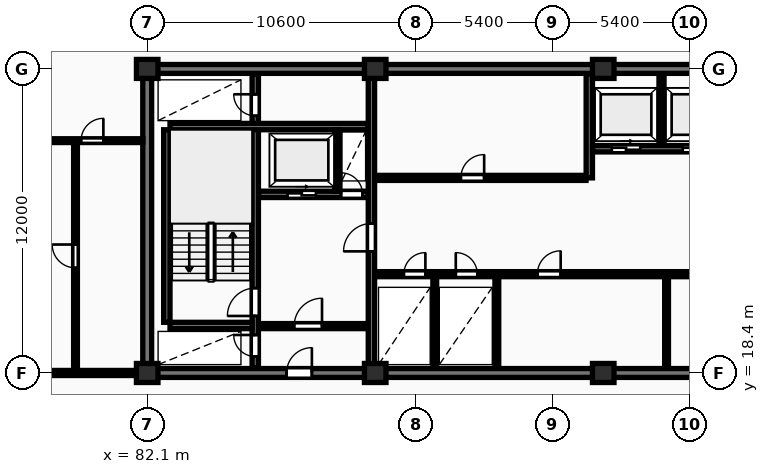
"""IFC4 building model, lengths in metres.
Left out: names, types, materials, properties, quantities, classifications, styles, units other than length and angle.
Written with IfcOpenShell. Run it as: python <this file> out.ifc"""

import sys

from ifc_helpers import new_model, si_unit, direction, frame, frame_2d, origin, origin_2d, place, context, subcontext, project, spatial, rectangle, extrude, element, fill, save


model = new_model("IFC4")
c1 = context("Model", 3, precision=1e-05, world=origin(), true_north=direction((0.0, 1.0)))
c2 = subcontext(c1, "Body", "Model", "MODEL_VIEW")
j1 = project(units=[si_unit("LENGTHUNIT", "METRE"), si_unit("PLANEANGLEUNIT", "RADIAN")], contexts=[c1])
p1 = place(None, origin())
s1 = spatial("IfcSite", under=j1, at=p1, CompositionType="ELEMENT")
p2 = place(p1, origin())
s2 = spatial("IfcBuilding", under=s1, at=p2, CompositionType="ELEMENT")
p3 = place(p2, frame((0.0, 0.0, 113.3)))
s3 = spatial("IfcBuildingStorey", under=s2, at=p3, CompositionType="ELEMENT", Elevation=113.3)
for number, where, z_axis, x_axis in (
    (1, (82.1, 18.4, 0.0), (0.0, 0.0, 1.0), (1.0, 0.0, 0.0)),
    (2, (82.1, 30.4, 0.0), (0.0, 0.0, 1.0), (1.0, 0.0, 0.0)),
    (3, (91.1, 18.4, 0.0), (0.0, 0.0, 1.0), (1.0, 0.0, 0.0)),
    (4, (91.1, 30.4, 0.0), (0.0, 0.0, 1.0), (1.0, 0.0, 0.0)),
    (5, (100.1, 18.4, 0.0), (0.0, 0.0, 1.0), (1.0, 0.0, 0.0)),
    (6, (100.1, 30.4, 0.0), (0.0, 0.0, 1.0), (1.0, 0.0, 0.0)),
):
    element("IfcColumn", number, at=place(p3, frame(where, z_axis=z_axis, x_axis=x_axis)), inside=s3, PredefinedType="COLUMN", context=c2, shape_type="SweptSolid", body=[
        extrude(rectangle(XDim=0.85, YDim=0.75, at=origin_2d()), origin(), (0.0, 0.0, 1.0), 3.25),
    ])
p4 = place(p3, frame((81.925, 30.4, 0.0), z_axis=(0.0, 0.0, 1.0), x_axis=(1.0, 0.0, 0.0)))
e7 = element("IfcWall", 7, at=p4, inside=s3, PredefinedType="SHEAR", context=c2, shape_type="SweptSolid", body=[
    extrude(rectangle(XDim=36.265, YDim=0.35, at=frame_2d((18.132, 0.0))), origin(), (0.0, 0.0, 1.0), 3.25),
])
p5 = place(p3, frame((82.1, 18.575, 0.0), z_axis=(0.0, 0.0, 1.0), x_axis=(0.0, 1.0, 0.0)))
e8 = element("IfcWall", 8, at=p5, inside=s3, PredefinedType="SHEAR", context=c2, shape_type="SweptSolid", body=[
    extrude(rectangle(XDim=11.65, YDim=0.35, at=frame_2d((5.825, 0.0))), origin(), (0.0, 0.0, 1.0), 3.25),
])
p6 = place(p3, frame((81.925, 18.4, 0.0), z_axis=(0.0, 0.0, 1.0), x_axis=(1.0, 0.0, 0.0)))
e9 = element("IfcWall", 9, at=p6, inside=s3, PredefinedType="SHEAR", context=c2, shape_type="SweptSolid", body=[
    extrude(rectangle(XDim=36.265, YDim=0.35, at=frame_2d((18.132, 0.0))), origin(), (0.0, 0.0, 1.0), 3.25),
])
p7 = place(p6, frame((5.675, 0.0, 0.0)))
e10 = element("IfcOpeningElement", 10, at=p7, cuts=e9, PredefinedType="OPENING", context=c2, shape_type="SweptSolid", body=[
    extrude(rectangle(XDim=1.0, YDim=2.15, at=frame_2d((0.5, 1.075))), frame((0.0, 0.185, 0.0), z_axis=(0.0, -1.0, 0.0), x_axis=(1.0, 0.0, 0.0)), (0.0, 0.0, 1.0), 0.37),
])
p8 = place(p6, frame((21.925, 0.0, 0.0)))
e11 = element("IfcOpeningElement", 11, at=p8, cuts=e9, PredefinedType="OPENING", context=c2, shape_type="SweptSolid", body=[
    extrude(rectangle(XDim=1.5, YDim=2.2, at=frame_2d((0.75, 1.1))), frame((0.0, 0.185, 0.0), z_axis=(0.0, -1.0, 0.0), x_axis=(1.0, 0.0, 0.0)), (0.0, 0.0, 1.0), 0.37),
])
p9 = place(p6, frame((29.875, 0.0, 0.0)))
e12 = element("IfcOpeningElement", 12, at=p9, cuts=e9, PredefinedType="OPENING", context=c2, shape_type="SweptSolid", body=[
    extrude(rectangle(XDim=1.0, YDim=2.15, at=frame_2d((0.5, 1.075))), frame((0.0, 0.185, 0.0), z_axis=(0.0, -1.0, 0.0), x_axis=(1.0, 0.0, 0.0)), (0.0, 0.0, 1.0), 0.37),
])
p10 = place(p3, frame((82.875, 20.4, 0.0), z_axis=(0.0, 0.0, 1.0), x_axis=(0.0, 1.0, 0.0)))
e13 = element("IfcWall", 13, at=p10, inside=s3, PredefinedType="SHEAR", context=c2, shape_type="SweptSolid", body=[
    extrude(rectangle(XDim=7.6, YDim=0.25, at=frame_2d((3.8, 0.0))), origin(), (0.0, 0.0, 1.0), 3.25),
])
p11 = place(p3, frame((86.365, 18.6, 0.0), z_axis=(0.0, 0.0, 1.0), x_axis=(0.0, 1.0, 0.0)))
e14 = element("IfcWall", 14, at=p11, inside=s3, PredefinedType="SHEAR", context=c2, shape_type="SweptSolid", body=[
    extrude(rectangle(XDim=11.6, YDim=0.25, at=frame_2d((5.8, 0.0))), origin(), (0.0, 0.0, 1.0), 3.25),
])
p12 = place(p11, frame((0.45, 0.0, 0.0)))
e15 = element("IfcOpeningElement", 15, at=p12, cuts=e14, PredefinedType="OPENING", context=c2, shape_type="SweptSolid", body=[
    extrude(rectangle(XDim=0.85, YDim=2.05, at=frame_2d((0.425, 1.025))), frame((0.0, 0.135, 0.0), z_axis=(0.0, -1.0, 0.0), x_axis=(1.0, 0.0, 0.0)), (0.0, 0.0, 1.0), 0.27),
])
p13 = place(p11, frame((2.05, 0.0, 0.0)))
e16 = element("IfcOpeningElement", 16, at=p13, cuts=e14, PredefinedType="OPENING", context=c2, shape_type="SweptSolid", body=[
    extrude(rectangle(XDim=1.1, YDim=2.1, at=frame_2d((0.55, 1.05))), frame((0.0, 0.135, 0.0), z_axis=(0.0, -1.0, 0.0), x_axis=(1.0, 0.0, 0.0)), (0.0, 0.0, 1.0), 0.27),
])
p14 = place(p11, frame((9.95, 0.0, 0.0)))
e17 = element("IfcOpeningElement", 17, at=p14, cuts=e14, PredefinedType="OPENING", context=c2, shape_type="SweptSolid", body=[
    extrude(rectangle(XDim=0.85, YDim=2.05, at=frame_2d((0.425, 1.025))), frame((0.0, 0.135, 0.0), z_axis=(0.0, -1.0, 0.0), x_axis=(1.0, 0.0, 0.0)), (0.0, 0.0, 1.0), 0.27),
])
p15 = place(p3, frame((83.0, 20.275, 0.0), z_axis=(0.0, 0.0, 1.0), x_axis=(1.0, 0.0, 0.0)))
e18 = element("IfcWall", 18, at=p15, inside=s3, PredefinedType="SHEAR", context=c2, shape_type="SweptSolid", body=[
    extrude(rectangle(XDim=3.24, YDim=0.25, at=frame_2d((1.62, 0.0))), origin(), (0.0, 0.0, 1.0), 3.25),
])
p16 = place(p3, frame((83.0, 28.125, 0.0), z_axis=(0.0, 0.0, 1.0), x_axis=(1.0, 0.0, 0.0)))
e19 = element("IfcWall", 19, at=p16, inside=s3, PredefinedType="SHEAR", context=c2, shape_type="SweptSolid", body=[
    extrude(rectangle(XDim=7.82, YDim=0.25, at=frame_2d((3.91, 0.0))), origin(), (0.0, 0.0, 1.0), 3.25),
])
p17 = place(p3, frame((86.5, 25.45, 0.0), z_axis=(0.0, 0.0, 1.0), x_axis=(1.0, 0.0, 0.0)))
e20 = element("IfcWall", 20, at=p17, inside=s3, PredefinedType="SHEAR", context=c2, shape_type="SweptSolid", body=[
    extrude(rectangle(XDim=4.32, YDim=0.25, at=frame_2d((2.16, 0.0))), origin(), (0.0, 0.0, 1.0), 3.25),
])
p18 = place(p17, frame((1.14, 0.0, 0.0)))
e21 = element("IfcOpeningElement", 21, at=p18, cuts=e20, PredefinedType="OPENING", context=c2, shape_type="SweptSolid", body=[
    extrude(rectangle(XDim=1.12, YDim=2.12, at=frame_2d((0.56, 1.06))), frame((0.0, 0.135, 0.0), z_axis=(0.0, -1.0, 0.0), x_axis=(1.0, 0.0, 0.0)), (0.0, 0.0, 1.0), 0.27),
])
p19 = place(p17, frame((3.25, 0.0, 0.0)))
e22 = element("IfcOpeningElement", 22, at=p19, cuts=e20, PredefinedType="OPENING", context=c2, shape_type="SweptSolid", body=[
    extrude(rectangle(XDim=0.85, YDim=2.05, at=frame_2d((0.425, 1.025))), frame((0.0, 0.135, 0.0), z_axis=(0.0, -1.0, 0.0), x_axis=(1.0, 0.0, 0.0)), (0.0, 0.0, 1.0), 0.27),
])
p20 = place(p3, frame((89.6, 25.58, 0.0), z_axis=(0.0, 0.0, 1.0), x_axis=(0.0, 1.0, 0.0)))
e23 = element("IfcWall", 23, at=p20, inside=s3, PredefinedType="PARTITIONING", context=c2, shape_type="SweptSolid", body=[
    extrude(rectangle(XDim=2.42, YDim=0.2, at=frame_2d((1.21, 0.0))), origin(), (0.0, 0.0, 1.0), 2.97),
])
p21 = place(p3, frame((86.5, 20.25, 0.0), z_axis=(0.0, 0.0, 1.0), x_axis=(1.0, 0.0, 0.0)))
e24 = element("IfcWall", 24, at=p21, inside=s3, PredefinedType="PARTITIONING", context=c2, shape_type="SweptSolid", body=[
    extrude(rectangle(XDim=4.32, YDim=0.2, at=frame_2d((2.16, 0.0))), origin(), (0.0, 0.0, 1.0), 2.97),
])
p22 = place(p21, frame((1.4, 0.0, 0.0)))
e25 = element("IfcOpeningElement", 25, at=p22, cuts=e24, PredefinedType="OPENING", context=c2, shape_type="SweptSolid", body=[
    extrude(rectangle(XDim=1.1, YDim=2.1, at=frame_2d((0.55, 1.05))), frame((0.0, 0.11, 0.0), z_axis=(0.0, -1.0, 0.0), x_axis=(1.0, 0.0, 0.0)), (0.0, 0.0, 1.0), 0.22),
])
p23 = place(p3, frame((90.95, 18.6, 0.0), z_axis=(0.0, 0.0, 1.0), x_axis=(0.0, 1.0, 0.0)))
e26 = element("IfcWall", 26, at=p23, inside=s3, PredefinedType="SHEAR", context=c2, shape_type="SweptSolid", body=[
    extrude(rectangle(XDim=11.6, YDim=0.25, at=frame_2d((5.8, 0.0))), origin(), (0.0, 0.0, 1.0), 3.25),
])
p24 = place(p23, frame((4.6, 0.0, 0.0)))
e27 = element("IfcOpeningElement", 27, at=p24, cuts=e26, PredefinedType="OPENING", context=c2, shape_type="SweptSolid", body=[
    extrude(rectangle(XDim=1.1, YDim=2.1, at=frame_2d((0.55, 1.05))), frame((0.0, 0.135, 0.0), z_axis=(0.0, -1.0, 0.0), x_axis=(1.0, 0.0, 0.0)), (0.0, 0.0, 1.0), 0.27),
])
p25 = place(p3, frame((91.08, 26.1, 0.0), z_axis=(0.0, 0.0, 1.0), x_axis=(1.0, 0.0, 0.0)))
e28 = element("IfcWall", 28, at=p25, inside=s3, PredefinedType="PARTITIONING", context=c2, shape_type="SweptSolid", body=[
    extrude(rectangle(XDim=8.34, YDim=0.2, at=frame_2d((4.17, 0.0))), origin(), (0.0, 0.0, 1.0), 2.97),
])
p26 = place(p25, frame((3.4, 0.0, 0.0)))
e29 = element("IfcOpeningElement", 29, at=p26, cuts=e28, PredefinedType="OPENING", context=c2, shape_type="SweptSolid", body=[
    extrude(rectangle(XDim=0.92, YDim=2.08, at=frame_2d((0.46, 1.04))), frame((0.0, 0.11, 0.0), z_axis=(0.0, -1.0, 0.0), x_axis=(1.0, 0.0, 0.0)), (0.0, 0.0, 1.0), 0.22),
])
p27 = place(p3, frame((99.55, 26.1, 0.0), z_axis=(0.0, 0.0, 1.0), x_axis=(0.0, 1.0, 0.0)))
e30 = element("IfcWall", 30, at=p27, inside=s3, PredefinedType="SHEAR", context=c2, shape_type="SweptSolid", body=[
    extrude(rectangle(XDim=4.1, YDim=0.25, at=frame_2d((2.05, 0.0))), origin(), (0.0, 0.0, 1.0), 3.25),
])
p28 = place(p3, frame((102.4, 27.38, 0.0), z_axis=(0.0, 0.0, 1.0), x_axis=(0.0, 1.0, 0.0)))
e31 = element("IfcWall", 31, at=p28, inside=s3, PredefinedType="PARTITIONING", context=c2, shape_type="SweptSolid", body=[
    extrude(rectangle(XDim=2.82, YDim=0.2, at=frame_2d((1.41, 0.0))), origin(), (0.0, 0.0, 1.0), 2.97),
])
p29 = place(p3, frame((99.68, 27.25, 0.0), z_axis=(0.0, 0.0, 1.0), x_axis=(1.0, 0.0, 0.0)))
e32 = element("IfcWall", 32, at=p29, inside=s3, PredefinedType="SHEAR", context=c2, shape_type="SweptSolid", body=[
    extrude(rectangle(XDim=10.54, YDim=0.25, at=frame_2d((5.27, 0.0))), origin(), (0.0, 0.0, 1.0), 3.25),
])
p30 = place(p29, frame((0.76, 0.0, 0.0)))
e33 = element("IfcOpeningElement", 33, at=p30, cuts=e32, PredefinedType="OPENING", context=c2, shape_type="SweptSolid", body=[
    extrude(rectangle(XDim=1.12, YDim=2.12, at=frame_2d((0.56, 1.06))), frame((0.0, 0.135, 0.0), z_axis=(0.0, -1.0, 0.0), x_axis=(1.0, 0.0, 0.0)), (0.0, 0.0, 1.0), 0.27),
])
p31 = place(p29, frame((3.56, 0.0, 0.0)))
e34 = element("IfcOpeningElement", 34, at=p31, cuts=e32, PredefinedType="OPENING", context=c2, shape_type="SweptSolid", body=[
    extrude(rectangle(XDim=1.12, YDim=2.12, at=frame_2d((0.56, 1.06))), frame((0.0, 0.135, 0.0), z_axis=(0.0, -1.0, 0.0), x_axis=(1.0, 0.0, 0.0)), (0.0, 0.0, 1.0), 0.27),
])
p32 = place(p29, frame((6.36, 0.0, 0.0)))
e35 = element("IfcOpeningElement", 35, at=p32, cuts=e32, PredefinedType="OPENING", context=c2, shape_type="SweptSolid", body=[
    extrude(rectangle(XDim=1.12, YDim=2.12, at=frame_2d((0.56, 1.06))), frame((0.0, 0.135, 0.0), z_axis=(0.0, -1.0, 0.0), x_axis=(1.0, 0.0, 0.0)), (0.0, 0.0, 1.0), 0.27),
])
p33 = place(p29, frame((8.92, 0.0, 0.0)))
e36 = element("IfcOpeningElement", 36, at=p33, cuts=e32, PredefinedType="OPENING", context=c2, shape_type="SweptSolid", body=[
    extrude(rectangle(XDim=0.85, YDim=2.05, at=frame_2d((0.425, 1.025))), frame((0.0, 0.135, 0.0), z_axis=(0.0, -1.0, 0.0), x_axis=(1.0, 0.0, 0.0)), (0.0, 0.0, 1.0), 0.27),
])
for number, where, z_axis, x_axis in (
    (37, (93.45, 18.6, 0.0), (0.0, 0.0, 1.0), (0.0, 1.0, 0.0)),
    (38, (95.9, 18.6, 0.0), (0.0, 0.0, 1.0), (0.0, 1.0, 0.0)),
    (39, (102.6, 18.6, 0.0), (0.0, 0.0, 1.0), (0.0, 1.0, 0.0)),
):
    element("IfcWall", number, at=place(p3, frame(where, z_axis=z_axis, x_axis=x_axis)), inside=s3, PredefinedType="PARTITIONING", context=c2, shape_type="SweptSolid", body=[
        extrude(rectangle(XDim=3.6, YDim=0.15, at=frame_2d((1.8, 0.0))), origin(), (0.0, 0.0, 1.0), 2.97),
    ])
p34 = place(p3, frame((91.08, 22.3, 0.0), z_axis=(0.0, 0.0, 1.0), x_axis=(1.0, 0.0, 0.0)))
e40 = element("IfcWall", 40, at=p34, inside=s3, PredefinedType="PARTITIONING", context=c2, shape_type="SweptSolid", body=[
    extrude(rectangle(XDim=19.14, YDim=0.2, at=frame_2d((9.57, 0.0))), origin(), (0.0, 0.0, 1.0), 2.97),
])
p35 = place(p34, frame((1.15, 0.0, 0.0)))
e41 = element("IfcOpeningElement", 41, at=p35, cuts=e40, PredefinedType="OPENING", context=c2, shape_type="SweptSolid", body=[
    extrude(rectangle(XDim=0.85, YDim=2.05, at=frame_2d((0.425, 1.025))), frame((0.0, 0.11, 0.0), z_axis=(0.0, -1.0, 0.0), x_axis=(1.0, 0.0, 0.0)), (0.0, 0.0, 1.0), 0.22),
])
p36 = place(p34, frame((3.2, 0.0, 0.0)))
e42 = element("IfcOpeningElement", 42, at=p36, cuts=e40, PredefinedType="OPENING", context=c2, shape_type="SweptSolid", body=[
    extrude(rectangle(XDim=0.85, YDim=2.05, at=frame_2d((0.425, 1.025))), frame((0.0, 0.11, 0.0), z_axis=(0.0, -1.0, 0.0), x_axis=(1.0, 0.0, 0.0)), (0.0, 0.0, 1.0), 0.22),
])
p37 = place(p34, frame((12.72, 0.0, 0.0)))
e43 = element("IfcOpeningElement", 43, at=p37, cuts=e40, PredefinedType="OPENING", context=c2, shape_type="SweptSolid", body=[
    extrude(rectangle(XDim=1.5, YDim=2.2, at=frame_2d((0.75, 1.1))), frame((0.0, 0.11, 0.0), z_axis=(0.0, -1.0, 0.0), x_axis=(1.0, 0.0, 0.0)), (0.0, 0.0, 1.0), 0.22),
])
p38 = place(p34, frame((6.42, 0.0, 0.0)))
e44 = element("IfcOpeningElement", 44, at=p38, cuts=e40, PredefinedType="OPENING", context=c2, shape_type="SweptSolid", body=[
    extrude(rectangle(XDim=0.92, YDim=2.08, at=frame_2d((0.46, 1.04))), frame((0.0, 0.11, 0.0), z_axis=(0.0, -1.0, 0.0), x_axis=(1.0, 0.0, 0.0)), (0.0, 0.0, 1.0), 0.22),
])
p39 = place(p34, frame((15.87, 0.0, 0.0)))
e45 = element("IfcOpeningElement", 45, at=p39, cuts=e40, PredefinedType="OPENING", context=c2, shape_type="SweptSolid", body=[
    extrude(rectangle(XDim=0.92, YDim=2.08, at=frame_2d((0.46, 1.04))), frame((0.0, 0.11, 0.0), z_axis=(0.0, -1.0, 0.0), x_axis=(1.0, 0.0, 0.0)), (0.0, 0.0, 1.0), 0.22),
])
p40 = place(p3, frame((79.27, 18.45, 0.0), z_axis=(0.0, 0.0, 1.0), x_axis=(0.0, 1.0, 0.0)))
e46 = element("IfcWall", 46, at=p40, inside=s3, PredefinedType="PARTITIONING", context=c2, shape_type="SweptSolid", body=[
    extrude(rectangle(XDim=9.12, YDim=0.15, at=frame_2d((4.56, 0.0))), origin(), (0.0, 0.0, 1.0), 2.97),
])
p41 = place(p40, frame((4.1, 0.0, 0.0)))
e47 = element("IfcOpeningElement", 47, at=p41, cuts=e46, PredefinedType="OPENING", context=c2, shape_type="SweptSolid", body=[
    extrude(rectangle(XDim=0.92, YDim=2.08, at=frame_2d((0.46, 1.04))), frame((0.0, 0.085, 0.0), z_axis=(0.0, -1.0, 0.0), x_axis=(1.0, 0.0, 0.0)), (0.0, 0.0, 1.0), 0.17),
])
p42 = place(p3, frame((75.17, 27.57, 0.0), z_axis=(0.0, 0.0, 1.0), x_axis=(1.0, 0.0, 0.0)))
e48 = element("IfcWall", 48, at=p42, inside=s3, PredefinedType="PARTITIONING", context=c2, shape_type="SweptSolid", body=[
    extrude(rectangle(XDim=6.76, YDim=0.15, at=frame_2d((3.38, 0.0))), origin(), (0.0, 0.0, 1.0), 2.97),
])
p43 = place(p42, frame((1.266, 0.0, 0.0)))
e49 = element("IfcOpeningElement", 49, at=p43, cuts=e48, PredefinedType="OPENING", context=c2, shape_type="SweptSolid", body=[
    extrude(rectangle(XDim=0.84, YDim=2.04, at=frame_2d((0.42, 1.02))), frame((0.0, 0.085, 0.0), z_axis=(0.0, -1.0, 0.0), x_axis=(1.0, 0.0, 0.0)), (0.0, 0.0, 1.0), 0.17),
])
p44 = place(p42, frame((4.32, 0.0, 0.0)))
e50 = element("IfcOpeningElement", 50, at=p44, cuts=e48, PredefinedType="OPENING", context=c2, shape_type="SweptSolid", body=[
    extrude(rectangle(XDim=0.88, YDim=2.06, at=frame_2d((0.44, 1.03))), frame((0.0, 0.085, 0.0), z_axis=(0.0, -1.0, 0.0), x_axis=(1.0, 0.0, 0.0)), (0.0, 0.0, 1.0), 0.17),
])
p45 = place(p3, frame((72.7, 18.4, 0.0), z_axis=(0.0, 0.0, 1.0), x_axis=(1.0, 0.0, 0.0)))
e51 = element("IfcWall", 51, at=p45, inside=s3, PredefinedType="PARTITIONING", context=c2, shape_type="SweptSolid", body=[
    extrude(rectangle(XDim=9.25, YDim=0.2, at=frame_2d((4.625, 0.0))), origin(), (0.0, 0.0, 1.0), 2.358),
])
p46 = place(p45, frame((4.15, 0.0, 0.0)))
e52 = element("IfcOpeningElement", 52, at=p46, cuts=e51, PredefinedType="OPENING", context=c2, shape_type="SweptSolid", body=[
    extrude(rectangle(XDim=0.95, YDim=2.15, at=frame_2d((0.475, 1.075))), frame((0.0, 0.11, 0.0), z_axis=(0.0, -1.0, 0.0), x_axis=(1.0, 0.0, 0.0)), (0.0, 0.0, 1.0), 0.22),
])
p47 = place(p7, origin())
e53 = element("IfcDoor", 53, at=p47, inside=s3, OperationType="SINGLE_SWING_RIGHT", PredefinedType="DOOR", context=c2, shape_type="SweptSolid", body=[
    extrude(rectangle(XDim=1.0, YDim=2.15, at=frame_2d((0.5, 1.075))), frame((0.0, 0.025, 0.0), z_axis=(0.0, -1.0, 0.0), x_axis=(1.0, 0.0, 0.0)), (0.0, 0.0, 1.0), 0.05),
])
fill(e10, e53)
p48 = place(p12, origin())
e54 = element("IfcDoor", 54, at=p48, inside=s3, OperationType="SINGLE_SWING_RIGHT", PredefinedType="DOOR", context=c2, shape_type="SweptSolid", body=[
    extrude(rectangle(XDim=0.85, YDim=2.05, at=frame_2d((0.425, 1.025))), frame((0.0, 0.025, 0.0), z_axis=(0.0, -1.0, 0.0), x_axis=(1.0, 0.0, 0.0)), (0.0, 0.0, 1.0), 0.05),
])
fill(e15, e54)
p49 = place(p13, origin())
e55 = element("IfcDoor", 55, at=p49, inside=s3, OperationType="SINGLE_SWING_LEFT", PredefinedType="DOOR", context=c2, shape_type="SweptSolid", body=[
    extrude(rectangle(XDim=1.1, YDim=2.1, at=frame_2d((0.55, 1.05))), frame((0.0, 0.025, 0.0), z_axis=(0.0, -1.0, 0.0), x_axis=(1.0, 0.0, 0.0)), (0.0, 0.0, 1.0), 0.05),
])
fill(e16, e55)
p50 = place(p14, origin())
e56 = element("IfcDoor", 56, at=p50, inside=s3, OperationType="SINGLE_SWING_RIGHT", PredefinedType="DOOR", context=c2, shape_type="SweptSolid", body=[
    extrude(rectangle(XDim=0.85, YDim=2.05, at=frame_2d((0.425, 1.025))), frame((0.0, 0.025, 0.0), z_axis=(0.0, -1.0, 0.0), x_axis=(1.0, 0.0, 0.0)), (0.0, 0.0, 1.0), 0.05),
])
fill(e17, e56)
p51 = place(p18, origin())
e57 = element("IfcDoor", 57, at=p51, inside=s3, OperationType="SLIDING_TO_RIGHT", PredefinedType="DOOR", context=c2, shape_type="SweptSolid", body=[
    extrude(rectangle(XDim=1.12, YDim=2.12, at=frame_2d((0.56, 1.06))), frame((0.0, 0.025, 0.0), z_axis=(0.0, -1.0, 0.0), x_axis=(1.0, 0.0, 0.0)), (0.0, 0.0, 1.0), 0.05),
])
fill(e21, e57)
p52 = place(p19, origin())
e58 = element("IfcDoor", 58, at=p52, inside=s3, OperationType="SINGLE_SWING_LEFT", PredefinedType="DOOR", context=c2, shape_type="SweptSolid", body=[
    extrude(rectangle(XDim=0.85, YDim=2.05, at=frame_2d((0.425, 1.025))), frame((0.0, 0.025, 0.0), z_axis=(0.0, -1.0, 0.0), x_axis=(1.0, 0.0, 0.0)), (0.0, 0.0, 1.0), 0.05),
])
fill(e22, e58)
p53 = place(p22, origin())
e59 = element("IfcDoor", 59, at=p53, inside=s3, OperationType="SINGLE_SWING_RIGHT", PredefinedType="DOOR", context=c2, shape_type="SweptSolid", body=[
    extrude(rectangle(XDim=1.1, YDim=2.1, at=frame_2d((0.55, 1.05))), frame((0.0, 0.025, 0.0), z_axis=(0.0, -1.0, 0.0), x_axis=(1.0, 0.0, 0.0)), (0.0, 0.0, 1.0), 0.05),
])
fill(e25, e59)
p54 = place(p24, origin())
e60 = element("IfcDoor", 60, at=p54, inside=s3, OperationType="SINGLE_SWING_LEFT", PredefinedType="DOOR", context=c2, shape_type="SweptSolid", body=[
    extrude(rectangle(XDim=1.1, YDim=2.1, at=frame_2d((0.55, 1.05))), frame((0.0, 0.025, 0.0), z_axis=(0.0, -1.0, 0.0), x_axis=(1.0, 0.0, 0.0)), (0.0, 0.0, 1.0), 0.05),
])
fill(e27, e60)
p55 = place(p26, origin())
e61 = element("IfcDoor", 61, at=p55, inside=s3, OperationType="SINGLE_SWING_RIGHT", PredefinedType="DOOR", context=c2, shape_type="SweptSolid", body=[
    extrude(rectangle(XDim=0.92, YDim=2.08, at=frame_2d((0.46, 1.04))), frame((0.0, 0.025, 0.0), z_axis=(0.0, -1.0, 0.0), x_axis=(1.0, 0.0, 0.0)), (0.0, 0.0, 1.0), 0.05),
])
fill(e29, e61)
p56 = place(p30, origin())
e62 = element("IfcDoor", 62, at=p56, inside=s3, OperationType="SLIDING_TO_RIGHT", PredefinedType="DOOR", context=c2, shape_type="SweptSolid", body=[
    extrude(rectangle(XDim=1.12, YDim=2.12, at=frame_2d((0.56, 1.06))), frame((0.0, 0.025, 0.0), z_axis=(0.0, -1.0, 0.0), x_axis=(1.0, 0.0, 0.0)), (0.0, 0.0, 1.0), 0.05),
])
fill(e33, e62)
p57 = place(p31, origin())
e63 = element("IfcDoor", 63, at=p57, inside=s3, OperationType="SLIDING_TO_RIGHT", PredefinedType="DOOR", context=c2, shape_type="SweptSolid", body=[
    extrude(rectangle(XDim=1.12, YDim=2.12, at=frame_2d((0.56, 1.06))), frame((0.0, 0.025, 0.0), z_axis=(0.0, -1.0, 0.0), x_axis=(1.0, 0.0, 0.0)), (0.0, 0.0, 1.0), 0.05),
])
fill(e34, e63)
p58 = place(p35, origin())
e64 = element("IfcDoor", 64, at=p58, inside=s3, OperationType="SINGLE_SWING_RIGHT", PredefinedType="DOOR", context=c2, shape_type="SweptSolid", body=[
    extrude(rectangle(XDim=0.85, YDim=2.05, at=frame_2d((0.425, 1.025))), frame((0.0, 0.025, 0.0), z_axis=(0.0, -1.0, 0.0), x_axis=(1.0, 0.0, 0.0)), (0.0, 0.0, 1.0), 0.05),
])
fill(e41, e64)
p59 = place(p36, origin())
e65 = element("IfcDoor", 65, at=p59, inside=s3, OperationType="SINGLE_SWING_LEFT", PredefinedType="DOOR", context=c2, shape_type="SweptSolid", body=[
    extrude(rectangle(XDim=0.85, YDim=2.05, at=frame_2d((0.425, 1.025))), frame((0.0, 0.025, 0.0), z_axis=(0.0, -1.0, 0.0), x_axis=(1.0, 0.0, 0.0)), (0.0, 0.0, 1.0), 0.05),
])
fill(e42, e65)
p60 = place(p38, origin())
e66 = element("IfcDoor", 66, at=p60, inside=s3, OperationType="SINGLE_SWING_RIGHT", PredefinedType="DOOR", context=c2, shape_type="SweptSolid", body=[
    extrude(rectangle(XDim=0.92, YDim=2.08, at=frame_2d((0.46, 1.04))), frame((0.0, 0.025, 0.0), z_axis=(0.0, -1.0, 0.0), x_axis=(1.0, 0.0, 0.0)), (0.0, 0.0, 1.0), 0.05),
])
fill(e44, e66)
p61 = place(p41, origin())
e67 = element("IfcDoor", 67, at=p61, inside=s3, OperationType="SINGLE_SWING_RIGHT", PredefinedType="DOOR", context=c2, shape_type="SweptSolid", body=[
    extrude(rectangle(XDim=0.92, YDim=2.08, at=frame_2d((0.46, 1.04))), frame((0.0, 0.025, 0.0), z_axis=(0.0, -1.0, 0.0), x_axis=(1.0, 0.0, 0.0)), (0.0, 0.0, 1.0), 0.05),
])
fill(e47, e67)
p62 = place(p44, origin())
e68 = element("IfcDoor", 68, at=p62, inside=s3, OperationType="SINGLE_SWING_RIGHT", PredefinedType="DOOR", context=c2, shape_type="SweptSolid", body=[
    extrude(rectangle(XDim=0.88, YDim=2.06, at=frame_2d((0.44, 1.03))), frame((0.0, 0.025, 0.0), z_axis=(0.0, -1.0, 0.0), x_axis=(1.0, 0.0, 0.0)), (0.0, 0.0, 1.0), 0.05),
])
fill(e50, e68)
save(model, sys.argv[1])
